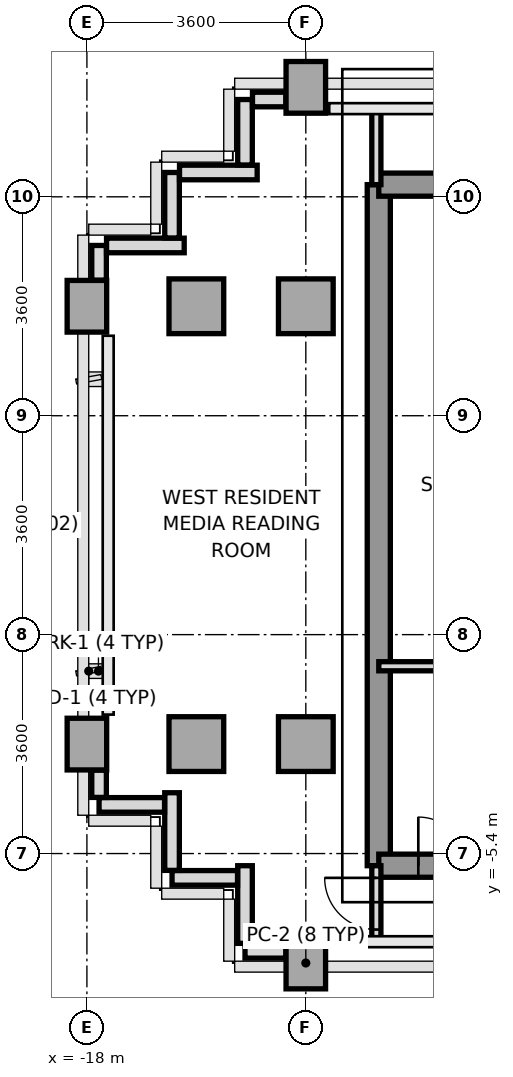
"""IFC4 building model, lengths in metres.
Left out: names, types, materials, properties, quantities, classifications, styles, units other than length and angle.
Written with IfcOpenShell. Run it as: python <this file> out.ifc"""

import sys

from ifc_helpers import new_model, si_unit, direction, frame, frame_2d, origin, origin_2d, place, context, subcontext, project, spatial, rectangle, extrude, source, transform, mapped, element, fill, save


model = new_model("IFC4")
c1 = context("Model", 3, precision=1e-05, world=origin(), true_north=direction((0.0, 1.0)))
c2 = subcontext(c1, "Body", "Model", "MODEL_VIEW")
j1 = project(units=[si_unit("LENGTHUNIT", "METRE"), si_unit("PLANEANGLEUNIT", "RADIAN")], contexts=[c1])
p1 = place(None, origin())
s1 = spatial("IfcSite", under=j1, at=p1, CompositionType="ELEMENT")
p2 = place(p1, origin())
s2 = spatial("IfcBuilding", under=s1, at=p2, CompositionType="ELEMENT")
p3 = place(p2, frame((0.0, 0.0, 204.6)))
s3 = spatial("IfcBuildingStorey", under=s2, at=p3, CompositionType="ELEMENT", Elevation=204.6)
m1 = source(origin(), c2, "Body", "SweptSolid", [
    extrude(rectangle(XDim=0.65, YDim=0.85, at=origin_2d()), origin(), (0.0, 0.0, 1.0), 3.2),
])
for number, where, z_axis, x_axis in (
    (1, (-18.0, -3.6, 0.0), (0.0, 0.0, 1.0), (1.0, 0.0, 0.0)),
    (2, (-18.0, 3.6, 0.0), (0.0, 0.0, 1.0), (1.0, 0.0, 0.0)),
):
    element("IfcColumn", number, at=place(p3, frame(where, z_axis=z_axis, x_axis=x_axis)), inside=s3, PredefinedType="COLUMN", context=c2, shape_type="MappedRepresentation", body=[
        mapped(m1, transform((0.0, 0.0, 0.0), x_axis=(1.0, 0.0, 0.0), y_axis=(0.0, 1.0, 0.0), z_axis=(0.0, 0.0, 1.0), scale=1.0)),
    ])
m2 = source(origin(), c2, "Body", "SweptSolid", [
    extrude(rectangle(XDim=0.9, YDim=0.9, at=origin_2d()), origin(), (0.0, 0.0, 1.0), 3.2),
])
for number, where, z_axis, x_axis in (
    (3, (-16.2, -3.6, 0.0), (0.0, 0.0, 1.0), (1.0, 0.0, 0.0)),
    (4, (-16.2, 3.6, 0.0), (0.0, 0.0, 1.0), (1.0, 0.0, 0.0)),
):
    element("IfcColumn", number, at=place(p3, frame(where, z_axis=z_axis, x_axis=x_axis)), inside=s3, PredefinedType="COLUMN", context=c2, shape_type="MappedRepresentation", body=[
        mapped(m2, transform((0.0, 0.0, 0.0), x_axis=(1.0, 0.0, 0.0), y_axis=(0.0, 1.0, 0.0), z_axis=(0.0, 0.0, 1.0), scale=1.0)),
    ])
p4 = place(p3, frame((-14.4, -7.2, 0.0), z_axis=(0.0, 0.0, 1.0), x_axis=(1.0, 0.0, 0.0)))
e5 = element("IfcColumn", 5, at=p4, inside=s3, PredefinedType="COLUMN", context=c2, shape_type="MappedRepresentation", body=[
    mapped(m1, transform((0.0, 0.0, 0.0), x_axis=(1.0, 0.0, 0.0), y_axis=(0.0, 1.0, 0.0), z_axis=(0.0, 0.0, 1.0), scale=1.0)),
])
for number, where, z_axis, x_axis in (
    (6, (-14.4, -3.6, 0.0), (0.0, 0.0, 1.0), (1.0, 0.0, 0.0)),
    (7, (-14.4, 3.6, 0.0), (0.0, 0.0, 1.0), (1.0, 0.0, 0.0)),
):
    element("IfcColumn", number, at=place(p3, frame(where, z_axis=z_axis, x_axis=x_axis)), inside=s3, PredefinedType="COLUMN", context=c2, shape_type="MappedRepresentation", body=[
        mapped(m2, transform((0.0, 0.0, 0.0), x_axis=(1.0, 0.0, 0.0), y_axis=(0.0, 1.0, 0.0), z_axis=(0.0, 0.0, 1.0), scale=1.0)),
    ])
p5 = place(p3, frame((-14.4, 7.2, 0.0), z_axis=(0.0, 0.0, 1.0), x_axis=(1.0, 0.0, 0.0)))
e8 = element("IfcColumn", 8, at=p5, inside=s3, PredefinedType="COLUMN", context=c2, shape_type="MappedRepresentation", body=[
    mapped(m1, transform((0.0, 0.0, 0.0), x_axis=(1.0, 0.0, 0.0), y_axis=(0.0, 1.0, 0.0), z_axis=(0.0, 0.0, 1.0), scale=1.0)),
])
p6 = place(p3, frame((-14.728, -7.0, 0.0), z_axis=(0.0, 0.0, 1.0), x_axis=(-1.0, 0.0, 0.0)))
e9 = element("IfcWall", 9, at=p6, inside=s3, PredefinedType="PARAPET", context=c2, shape_type="SweptSolid", body=[
    extrude(rectangle(XDim=0.672, YDim=0.24, at=frame_2d((0.336, 0.0))), origin(), (0.0, 0.0, 1.0), 1.15),
])
p7 = place(p3, frame((-15.4, -6.877, 0.0), z_axis=(0.0, 0.0, 1.0), x_axis=(0.0, 1.0, 0.0)))
e10 = element("IfcWall", 10, at=p7, inside=s3, PredefinedType="PARAPET", context=c2, shape_type="SweptSolid", body=[
    extrude(rectangle(XDim=1.277, YDim=0.24, at=frame_2d((0.638, 0.0))), origin(), (0.0, 0.0, 1.0), 1.15),
])
p8 = place(p3, frame((-15.523, -5.8, 0.0), z_axis=(0.0, 0.0, 1.0), x_axis=(-1.0, 0.0, 0.0)))
e11 = element("IfcWall", 11, at=p8, inside=s3, PredefinedType="PARAPET", context=c2, shape_type="SweptSolid", body=[
    extrude(rectangle(XDim=1.077, YDim=0.24, at=frame_2d((0.539, 0.0))), origin(), (0.0, 0.0, 1.0), 1.15),
])
p9 = place(p3, frame((-16.6, -5.677, 0.0), z_axis=(0.0, 0.0, 1.0), x_axis=(0.0, 1.0, 0.0)))
e12 = element("IfcWall", 12, at=p9, inside=s3, PredefinedType="PARAPET", context=c2, shape_type="SweptSolid", body=[
    extrude(rectangle(XDim=1.277, YDim=0.24, at=frame_2d((0.639, 0.0))), origin(), (0.0, 0.0, 1.0), 1.15),
])
p10 = place(p3, frame((-16.723, -4.6, 0.0), z_axis=(0.0, 0.0, 1.0), x_axis=(-1.0, 0.0, 0.0)))
e13 = element("IfcWall", 13, at=p10, inside=s3, PredefinedType="PARAPET", context=c2, shape_type="SweptSolid", body=[
    extrude(rectangle(XDim=1.077, YDim=0.24, at=frame_2d((0.539, 0.0))), origin(), (0.0, 0.0, 1.0), 1.15),
])
p11 = place(p3, frame((-17.8, -4.477, 0.0), z_axis=(0.0, 0.0, 1.0), x_axis=(0.0, 1.0, 0.0)))
e14 = element("IfcWall", 14, at=p11, inside=s3, PredefinedType="PARAPET", context=c2, shape_type="SweptSolid", body=[
    extrude(rectangle(XDim=0.449, YDim=0.24, at=frame_2d((0.225, 0.0))), origin(), (0.0, 0.0, 1.0), 1.15),
])
p12 = place(p3, frame((-17.8, 4.028, 0.0), z_axis=(0.0, 0.0, 1.0), x_axis=(0.0, 1.0, 0.0)))
e15 = element("IfcWall", 15, at=p12, inside=s3, PredefinedType="PARAPET", context=c2, shape_type="SweptSolid", body=[
    extrude(rectangle(XDim=0.572, YDim=0.24, at=frame_2d((0.286, 0.0))), origin(), (0.0, 0.0, 1.0), 1.15),
])
p13 = place(p3, frame((-17.677, 4.6, 0.0), z_axis=(0.0, 0.0, 1.0), x_axis=(1.0, 0.0, 0.0)))
e16 = element("IfcWall", 16, at=p13, inside=s3, PredefinedType="PARAPET", context=c2, shape_type="SweptSolid", body=[
    extrude(rectangle(XDim=1.277, YDim=0.24, at=frame_2d((0.639, 0.0))), origin(), (0.0, 0.0, 1.0), 1.15),
])
p14 = place(p3, frame((-16.6, 4.723, 0.0), z_axis=(0.0, 0.0, 1.0), x_axis=(0.0, 1.0, 0.0)))
e17 = element("IfcWall", 17, at=p14, inside=s3, PredefinedType="PARAPET", context=c2, shape_type="SweptSolid", body=[
    extrude(rectangle(XDim=1.077, YDim=0.24, at=frame_2d((0.539, 0.0))), origin(), (0.0, 0.0, 1.0), 1.15),
])
p15 = place(p3, frame((-16.477, 5.8, 0.0), z_axis=(0.0, 0.0, 1.0), x_axis=(1.0, 0.0, 0.0)))
e18 = element("IfcWall", 18, at=p15, inside=s3, PredefinedType="PARAPET", context=c2, shape_type="SweptSolid", body=[
    extrude(rectangle(XDim=1.277, YDim=0.24, at=frame_2d((0.639, 0.0))), origin(), (0.0, 0.0, 1.0), 1.15),
])
p16 = place(p3, frame((-15.4, 5.923, 0.0), z_axis=(0.0, 0.0, 1.0), x_axis=(0.0, 1.0, 0.0)))
e19 = element("IfcWall", 19, at=p16, inside=s3, PredefinedType="PARAPET", context=c2, shape_type="SweptSolid", body=[
    extrude(rectangle(XDim=1.077, YDim=0.24, at=frame_2d((0.539, 0.0))), origin(), (0.0, 0.0, 1.0), 1.15),
])
p17 = place(p3, frame((-15.277, 7.0, 0.0), z_axis=(0.0, 0.0, 1.0), x_axis=(1.0, 0.0, 0.0)))
e20 = element("IfcWall", 20, at=p17, inside=s3, PredefinedType="PARAPET", context=c2, shape_type="SweptSolid", body=[
    extrude(rectangle(XDim=0.549, YDim=0.24, at=frame_2d((0.274, 0.0))), origin(), (0.0, 0.0, 1.0), 1.15),
])
p18 = place(p3, frame((-13.2, -5.6, 0.0), z_axis=(0.0, 0.0, 1.0), x_axis=(0.0, 1.0, 0.0)))
e21 = element("IfcWall", 21, at=p18, inside=s3, PredefinedType="SHEAR", context=c2, shape_type="SweptSolid", body=[
    extrude(rectangle(XDim=11.2, YDim=0.38, at=frame_2d((5.6, 0.0))), origin(), (0.0, 0.0, 1.0), 3.2),
])
p19 = place(p3, frame((-13.2, 5.6, 0.0), z_axis=(0.0, 0.0, 1.0), x_axis=(1.0, 0.0, 0.0)))
e22 = element("IfcWall", 22, at=p19, inside=s3, PredefinedType="SHEAR", context=c2, shape_type="SweptSolid", body=[
    extrude(rectangle(XDim=1.844, YDim=0.38, at=frame_2d((0.922, 0.0))), origin(), (0.0, 0.0, 1.0), 3.2),
])
p20 = place(p3, frame((-13.2, -5.6, 0.0), z_axis=(0.0, 0.0, 1.0), x_axis=(1.0, 0.0, 0.0)))
e23 = element("IfcWall", 23, at=p20, inside=s3, PredefinedType="SHEAR", context=c2, shape_type="SweptSolid", body=[
    extrude(rectangle(XDim=7.8, YDim=0.38, at=frame_2d((3.9, 0.0))), origin(), (0.0, 0.0, 1.0), 3.2),
])
p21 = place(p20, frame((0.65, 0.0, 0.0)))
e24 = element("IfcOpeningElement", 24, at=p21, cuts=e23, PredefinedType="OPENING", context=c2, shape_type="SweptSolid", body=[
    extrude(rectangle(XDim=0.8, YDim=2.1, at=frame_2d((0.4, 1.05))), frame((0.0, 0.2, 0.0), z_axis=(0.0, -1.0, 0.0), x_axis=(1.0, 0.0, 0.0)), (0.0, 0.0, 1.0), 0.4),
])
p22 = place(p20, frame((4.2, 0.0, 0.0)))
e25 = element("IfcOpeningElement", 25, at=p22, cuts=e23, PredefinedType="OPENING", context=c2, shape_type="SweptSolid", body=[
    extrude(rectangle(XDim=0.95, YDim=2.15, at=frame_2d((0.475, 1.075))), frame((0.0, 0.2, 0.0), z_axis=(0.0, -1.0, 0.0), x_axis=(1.0, 0.0, 0.0)), (0.0, 0.0, 1.0), 0.4),
])
p23 = place(p3, frame((-13.2, -2.32, 0.0), z_axis=(0.0, 0.0, 1.0), x_axis=(1.0, 0.0, 0.0)))
e26 = element("IfcWall", 26, at=p23, inside=s3, PredefinedType="PARTITIONING", context=c2, shape_type="SweptSolid", body=[
    extrude(rectangle(XDim=2.18, YDim=0.15, at=frame_2d((1.09, 0.0))), origin(), (0.0, 0.0, 1.0), 3.2),
])
p24 = place(p3, frame((-13.24, 5.6, 0.0), z_axis=(0.0, 0.0, 1.0), x_axis=(0.0, 1.0, 0.0)))
e27 = element("IfcWall", 27, at=p24, inside=s3, PredefinedType="PARTITIONING", context=c2, shape_type="SweptSolid", body=[
    extrude(rectangle(XDim=1.25, YDim=0.15, at=frame_2d((0.625, 0.0))), origin(), (0.0, 0.0, 1.0), 3.2),
])
p25 = place(p3, frame((-13.24, -6.85, 0.0), z_axis=(0.0, 0.0, 1.0), x_axis=(0.0, 1.0, 0.0)))
e28 = element("IfcWall", 28, at=p25, inside=s3, PredefinedType="PARTITIONING", context=c2, shape_type="SweptSolid", body=[
    extrude(rectangle(XDim=1.25, YDim=0.15, at=frame_2d((0.625, 0.0))), origin(), (0.0, 0.0, 1.0), 3.2),
])
p26 = place(p25, frame((0.2, 0.0, 0.0)))
e29 = element("IfcOpeningElement", 29, at=p26, cuts=e28, PredefinedType="OPENING", context=c2, shape_type="SweptSolid", body=[
    extrude(rectangle(XDim=0.85, YDim=2.1, at=frame_2d((0.425, 1.05))), frame((0.0, 0.085, 0.0), z_axis=(0.0, -1.0, 0.0), x_axis=(1.0, 0.0, 0.0)), (0.0, 0.0, 1.0), 0.17),
])
m3 = source(origin(), c2, "Body", "SweptSolid", [
    extrude(rectangle(XDim=0.8, YDim=2.1, at=frame_2d((0.4, 1.05))), frame((0.0, 0.025, 0.0), z_axis=(0.0, -1.0, 0.0), x_axis=(1.0, 0.0, 0.0)), (0.0, 0.0, 1.0), 0.05),
])
p27 = place(p21, origin())
e30 = element("IfcDoor", 30, at=p27, inside=s3, OperationType="SINGLE_SWING_LEFT", PredefinedType="DOOR", context=c2, shape_type="MappedRepresentation", body=[
    mapped(m3, transform((0.0, 0.0, 0.0), x_axis=(1.0, 0.0, 0.0), y_axis=(0.0, 1.0, 0.0), z_axis=(0.0, 0.0, 1.0), scale=1.0)),
])
fill(e24, e30)
m4 = source(origin(), c2, "Body", "SweptSolid", [
    extrude(rectangle(XDim=0.85, YDim=2.1, at=frame_2d((0.425, 1.05))), frame((0.0, 0.025, 0.0), z_axis=(0.0, -1.0, 0.0), x_axis=(1.0, 0.0, 0.0)), (0.0, 0.0, 1.0), 0.05),
])
p28 = place(p26, origin())
e31 = element("IfcDoor", 31, at=p28, inside=s3, OperationType="SINGLE_SWING_RIGHT", PredefinedType="DOOR", context=c2, shape_type="MappedRepresentation", body=[
    mapped(m4, transform((0.0, 0.0, 0.0), x_axis=(1.0, 0.0, 0.0), y_axis=(0.0, 1.0, 0.0), z_axis=(0.0, 0.0, 1.0), scale=1.0)),
])
fill(e29, e31)
save(model, sys.argv[1])
